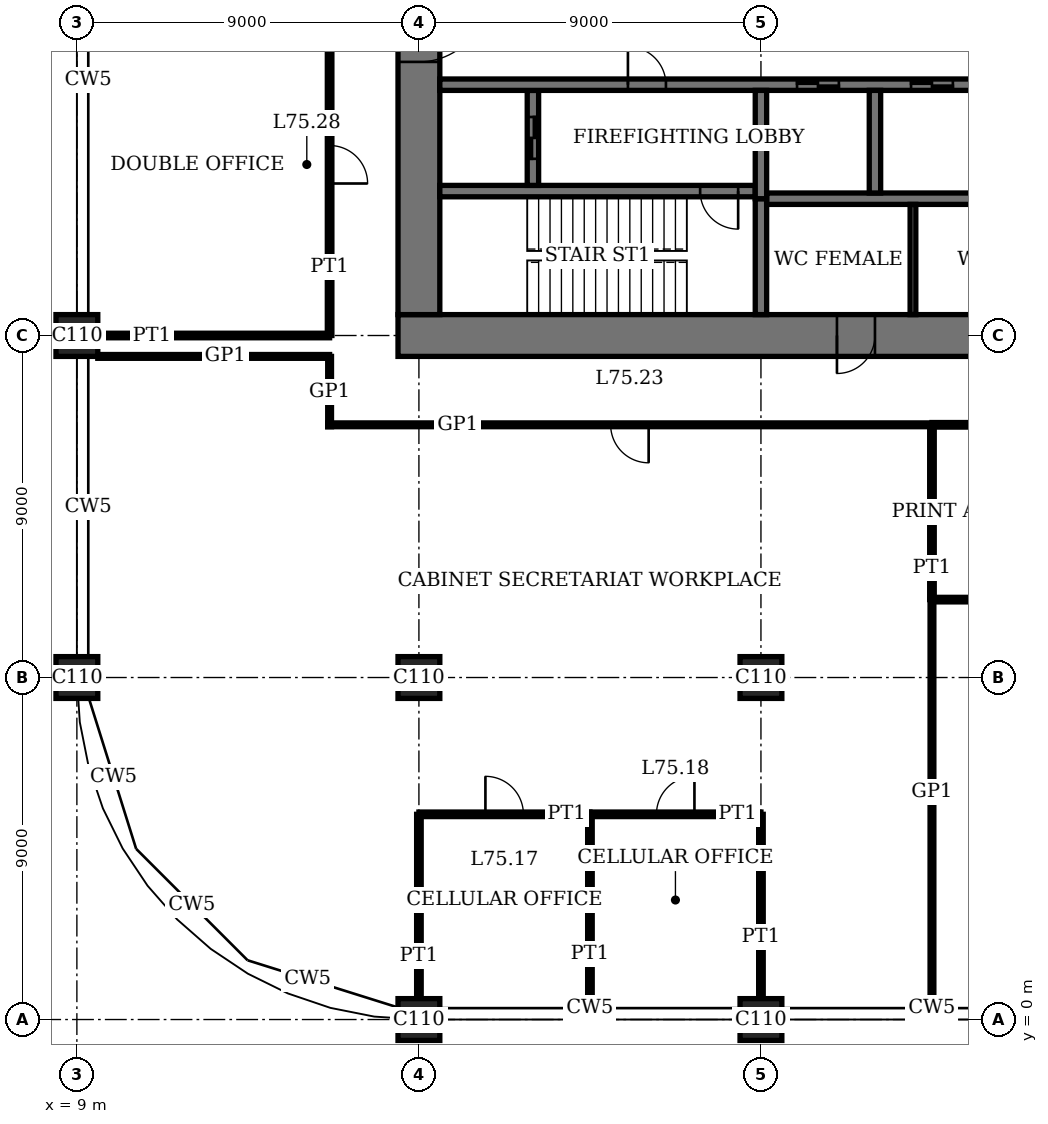
"""IFC4 building model, lengths in metres.
Left out: names, types, materials, properties, quantities, classifications, styles, units other than length and angle.
Written with IfcOpenShell. Run it as: python <this file> out.ifc"""

import sys

from ifc_helpers import new_model, si_unit, direction, frame, frame_2d, origin, origin_2d, place, context, subcontext, project, spatial, rectangle, extrude, element, fill, save


model = new_model("IFC4")
c1 = context("Model", 3, precision=1e-05, world=origin(), true_north=direction((0.0, 1.0)))
c2 = subcontext(c1, "Body", "Model", "MODEL_VIEW")
j1 = project(units=[si_unit("LENGTHUNIT", "METRE"), si_unit("PLANEANGLEUNIT", "RADIAN")], contexts=[c1])
p1 = place(None, origin())
s1 = spatial("IfcSite", under=j1, at=p1, CompositionType="ELEMENT")
p2 = place(p1, origin())
s2 = spatial("IfcBuilding", under=s1, at=p2, CompositionType="ELEMENT")
p3 = place(p2, frame((0.0, 0.0, 307.4)))
s3 = spatial("IfcBuildingStorey", under=s2, at=p3, CompositionType="ELEMENT", Elevation=307.4)
for number, where, z_axis, x_axis in (
    (1, (9.0, 9.0, 0.0), (0.0, 0.0, 1.0), (1.0, 0.0, 0.0)),
    (2, (9.0, 18.0, 0.0), (0.0, 0.0, 1.0), (1.0, 0.0, 0.0)),
    (3, (18.0, 0.0, 0.0), (0.0, 0.0, 1.0), (1.0, 0.0, 0.0)),
    (4, (18.0, 9.0, 0.0), (0.0, 0.0, 1.0), (1.0, 0.0, 0.0)),
    (5, (27.0, 0.0, 0.0), (0.0, 0.0, 1.0), (1.0, 0.0, 0.0)),
    (6, (27.0, 9.0, 0.0), (0.0, 0.0, 1.0), (1.0, 0.0, 0.0)),
):
    element("IfcColumn", number, at=place(p3, frame(where, z_axis=z_axis, x_axis=x_axis)), inside=s3, PredefinedType="COLUMN", context=c2, shape_type="SweptSolid", body=[
        extrude(rectangle(XDim=1.1, YDim=1.1, at=origin_2d()), origin(), (0.0, 0.0, 1.0), 4.4),
    ])
p4 = place(p3, frame((17.45, 18.0, 0.0), z_axis=(0.0, 0.0, 1.0), x_axis=(1.0, 0.0, 0.0)))
e7 = element("IfcWall", 7, at=p4, inside=s3, PredefinedType="SHEAR", context=c2, shape_type="SweptSolid", body=[
    extrude(rectangle(XDim=28.1, YDim=1.1, at=frame_2d((14.05, 0.0))), origin(), (0.0, 0.0, 1.0), 4.4),
])
p5 = place(p4, frame((11.55, 0.0, 0.0)))
e8 = element("IfcOpeningElement", 8, at=p5, cuts=e7, PredefinedType="OPENING", context=c2, shape_type="SweptSolid", body=[
    extrude(rectangle(XDim=1.0, YDim=2.4, at=frame_2d((0.5, 1.2))), frame((0.0, 0.56, 0.0), z_axis=(0.0, -1.0, 0.0), x_axis=(1.0, 0.0, 0.0)), (0.0, 0.0, 1.0), 1.12),
])
p6 = place(p4, frame((16.55, 0.0, 0.0)))
e9 = element("IfcOpeningElement", 9, at=p6, cuts=e7, PredefinedType="OPENING", context=c2, shape_type="SweptSolid", body=[
    extrude(rectangle(XDim=1.0, YDim=2.4, at=frame_2d((0.5, 1.2))), frame((0.0, 0.56, 0.0), z_axis=(0.0, -1.0, 0.0), x_axis=(1.0, 0.0, 0.0)), (0.0, 0.0, 1.0), 1.12),
])
p7 = place(p4, frame((20.0, 0.0, 0.0)))
e10 = element("IfcOpeningElement", 10, at=p7, cuts=e7, PredefinedType="OPENING", context=c2, shape_type="SweptSolid", body=[
    extrude(rectangle(XDim=1.1, YDim=2.4, at=frame_2d((0.55, 1.2))), frame((0.0, 0.56, 0.0), z_axis=(0.0, -1.0, 0.0), x_axis=(1.0, 0.0, 0.0)), (0.0, 0.0, 1.0), 1.12),
])
p8 = place(p4, frame((24.05, 0.0, 0.0)))
e11 = element("IfcOpeningElement", 11, at=p8, cuts=e7, PredefinedType="OPENING", context=c2, shape_type="SweptSolid", body=[
    extrude(rectangle(XDim=1.0, YDim=2.4, at=frame_2d((0.5, 1.2))), frame((0.0, 0.56, 0.0), z_axis=(0.0, -1.0, 0.0), x_axis=(1.0, 0.0, 0.0)), (0.0, 0.0, 1.0), 1.12),
])
p9 = place(p3, frame((18.0, 35.45, 0.0), z_axis=(0.0, 0.0, 1.0), x_axis=(0.0, -1.0, 0.0)))
e12 = element("IfcWall", 12, at=p9, inside=s3, PredefinedType="SHEAR", context=c2, shape_type="SweptSolid", body=[
    extrude(rectangle(XDim=16.9, YDim=1.1, at=frame_2d((8.45, 0.0))), origin(), (0.0, 0.0, 1.0), 4.4),
])
p10 = place(p9, frame((8.45, 0.0, 0.0)))
e13 = element("IfcOpeningElement", 13, at=p10, cuts=e12, PredefinedType="OPENING", context=c2, shape_type="SweptSolid", body=[
    extrude(rectangle(XDim=1.8, YDim=2.4, at=frame_2d((0.9, 1.2))), frame((0.0, 0.56, 0.0), z_axis=(0.0, -1.0, 0.0), x_axis=(1.0, 0.0, 0.0)), (0.0, 0.0, 1.0), 1.12),
])
p11 = place(p3, frame((18.55, 21.8, 0.0), z_axis=(0.0, 0.0, 1.0), x_axis=(1.0, 0.0, 0.0)))
e14 = element("IfcWall", 14, at=p11, inside=s3, PredefinedType="SHEAR", context=c2, shape_type="SweptSolid", body=[
    extrude(rectangle(XDim=8.3, YDim=0.3, at=frame_2d((4.15, 0.0))), origin(), (0.0, 0.0, 1.0), 4.4),
])
p12 = place(p11, frame((6.85, 0.0, 0.0)))
e15 = element("IfcOpeningElement", 15, at=p12, cuts=e14, PredefinedType="OPENING", context=c2, shape_type="SweptSolid", body=[
    extrude(rectangle(XDim=1.0, YDim=2.4, at=frame_2d((0.5, 1.2))), frame((0.0, 0.16, 0.0), z_axis=(0.0, -1.0, 0.0), x_axis=(1.0, 0.0, 0.0)), (0.0, 0.0, 1.0), 0.32),
])
p13 = place(p3, frame((27.0, 18.55, 0.0), z_axis=(0.0, 0.0, 1.0), x_axis=(0.0, 1.0, 0.0)))
e16 = element("IfcWall", 16, at=p13, inside=s3, PredefinedType="SHEAR", context=c2, shape_type="SweptSolid", body=[
    extrude(rectangle(XDim=3.05, YDim=0.3, at=frame_2d((1.525, 0.0))), origin(), (0.0, 0.0, 1.0), 4.4),
])
p14 = place(p3, frame((21.0, 21.95, 0.0), z_axis=(0.0, 0.0, 1.0), x_axis=(0.0, 1.0, 0.0)))
e17 = element("IfcWall", 17, at=p14, inside=s3, PredefinedType="SHEAR", context=c2, shape_type="SweptSolid", body=[
    extrude(rectangle(XDim=2.5, YDim=0.3, at=frame_2d((1.25, 0.0))), origin(), (0.0, 0.0, 1.0), 4.4),
])
p15 = place(p14, frame((0.7, 0.0, 0.0)))
e18 = element("IfcOpeningElement", 18, at=p15, cuts=e17, PredefinedType="OPENING", context=c2, shape_type="SweptSolid", body=[
    extrude(rectangle(XDim=1.1, YDim=2.4, at=frame_2d((0.55, 1.2))), frame((0.0, 0.16, 0.0), z_axis=(0.0, -1.0, 0.0), x_axis=(1.0, 0.0, 0.0)), (0.0, 0.0, 1.0), 0.32),
])
p16 = place(p3, frame((18.55, 24.6, 0.0), z_axis=(0.0, 0.0, 1.0), x_axis=(1.0, 0.0, 0.0)))
e19 = element("IfcWall", 19, at=p16, inside=s3, PredefinedType="SHEAR", context=c2, shape_type="SweptSolid", body=[
    extrude(rectangle(XDim=25.9, YDim=0.3, at=frame_2d((12.95, 0.0))), origin(), (0.0, 0.0, 1.0), 4.4),
])
p17 = place(p16, frame((4.95, 0.0, 0.0)))
e20 = element("IfcOpeningElement", 20, at=p17, cuts=e19, PredefinedType="OPENING", context=c2, shape_type="SweptSolid", body=[
    extrude(rectangle(XDim=1.0, YDim=2.4, at=frame_2d((0.5, 1.2))), frame((0.0, 0.16, 0.0), z_axis=(0.0, -1.0, 0.0), x_axis=(1.0, 0.0, 0.0)), (0.0, 0.0, 1.0), 0.32),
])
p18 = place(p16, frame((24.5, 0.0, 0.0)))
e21 = element("IfcOpeningElement", 21, at=p18, cuts=e19, PredefinedType="OPENING", context=c2, shape_type="SweptSolid", body=[
    extrude(rectangle(XDim=0.9, YDim=2.1, at=frame_2d((0.45, 1.05))), frame((0.0, 0.16, 0.0), z_axis=(0.0, -1.0, 0.0), x_axis=(1.0, 0.0, 0.0)), (0.0, 0.0, 1.0), 0.32),
])
p19 = place(p16, frame((9.4, 0.0, 0.0)))
e22 = element("IfcOpeningElement", 22, at=p19, cuts=e19, PredefinedType="OPENING", context=c2, shape_type="SweptSolid", body=[
    extrude(rectangle(XDim=1.1, YDim=2.4, at=frame_2d((0.55, 1.2))), frame((0.0, 0.16, 0.0), z_axis=(0.0, -1.0, 0.0), x_axis=(1.0, 0.0, 0.0)), (0.0, 0.0, 1.0), 0.32),
])
p20 = place(p16, frame((12.4, 0.0, 0.0)))
e23 = element("IfcOpeningElement", 23, at=p20, cuts=e19, PredefinedType="OPENING", context=c2, shape_type="SweptSolid", body=[
    extrude(rectangle(XDim=1.1, YDim=2.4, at=frame_2d((0.55, 1.2))), frame((0.0, 0.16, 0.0), z_axis=(0.0, -1.0, 0.0), x_axis=(1.0, 0.0, 0.0)), (0.0, 0.0, 1.0), 0.32),
])
p21 = place(p16, frame((15.4, 0.0, 0.0)))
e24 = element("IfcOpeningElement", 24, at=p21, cuts=e19, PredefinedType="OPENING", context=c2, shape_type="SweptSolid", body=[
    extrude(rectangle(XDim=1.1, YDim=2.4, at=frame_2d((0.55, 1.2))), frame((0.0, 0.16, 0.0), z_axis=(0.0, -1.0, 0.0), x_axis=(1.0, 0.0, 0.0)), (0.0, 0.0, 1.0), 0.32),
])
p22 = place(p16, frame((18.4, 0.0, 0.0)))
e25 = element("IfcOpeningElement", 25, at=p22, cuts=e19, PredefinedType="OPENING", context=c2, shape_type="SweptSolid", body=[
    extrude(rectangle(XDim=1.1, YDim=2.4, at=frame_2d((0.55, 1.2))), frame((0.0, 0.16, 0.0), z_axis=(0.0, -1.0, 0.0), x_axis=(1.0, 0.0, 0.0)), (0.0, 0.0, 1.0), 0.32),
])
p23 = place(p16, frame((21.3, 0.0, 0.0)))
e26 = element("IfcOpeningElement", 26, at=p23, cuts=e19, PredefinedType="OPENING", context=c2, shape_type="SweptSolid", body=[
    extrude(rectangle(XDim=1.3, YDim=2.4, at=frame_2d((0.65, 1.2))), frame((0.0, 0.16, 0.0), z_axis=(0.0, -1.0, 0.0), x_axis=(1.0, 0.0, 0.0)), (0.0, 0.0, 1.0), 0.32),
])
p24 = place(p3, frame((27.15, 21.6, 0.0), z_axis=(0.0, 0.0, 1.0), x_axis=(1.0, 0.0, 0.0)))
e27 = element("IfcWall", 27, at=p24, inside=s3, PredefinedType="SHEAR", context=c2, shape_type="SweptSolid", body=[
    extrude(rectangle(XDim=17.3, YDim=0.3, at=frame_2d((8.65, 0.0))), origin(), (0.0, 0.0, 1.0), 4.4),
])
p25 = place(p3, frame((30.0, 21.75, 0.0), z_axis=(0.0, 0.0, 1.0), x_axis=(0.0, 1.0, 0.0)))
e28 = element("IfcWall", 28, at=p25, inside=s3, PredefinedType="SHEAR", context=c2, shape_type="SweptSolid", body=[
    extrude(rectangle(XDim=2.7, YDim=0.3, at=frame_2d((1.35, 0.0))), origin(), (0.0, 0.0, 1.0), 4.4),
])
p26 = place(p3, frame((27.0, 21.6, 0.0), z_axis=(0.0, 0.0, 1.0), x_axis=(0.0, 1.0, 0.0)))
e29 = element("IfcWall", 29, at=p26, inside=s3, PredefinedType="SHEAR", context=c2, shape_type="SweptSolid", body=[
    extrude(rectangle(XDim=2.85, YDim=0.3, at=frame_2d((1.425, 0.0))), origin(), (0.0, 0.0, 1.0), 4.4),
])
p27 = place(p3, frame((18.0, 5.4, 0.0), z_axis=(0.0, 0.0, 1.0), x_axis=(1.0, 0.0, 0.0)))
e30 = element("IfcWall", 30, at=p27, inside=s3, PredefinedType="PARTITIONING", context=c2, shape_type="SweptSolid", body=[
    extrude(rectangle(XDim=4.5, YDim=0.12, at=frame_2d((2.25, 0.0))), origin(), (0.0, 0.0, 1.0), 4.05),
])
p28 = place(p27, frame((1.75, 0.0, 0.0)))
e31 = element("IfcOpeningElement", 31, at=p28, cuts=e30, PredefinedType="OPENING", context=c2, shape_type="SweptSolid", body=[
    extrude(rectangle(XDim=1.0, YDim=2.4, at=frame_2d((0.5, 1.2))), frame((0.0, 0.07, 0.0), z_axis=(0.0, -1.0, 0.0), x_axis=(1.0, 0.0, 0.0)), (0.0, 0.0, 1.0), 0.14),
])
p29 = place(p3, frame((22.5, 5.4, 0.0), z_axis=(0.0, 0.0, 1.0), x_axis=(1.0, 0.0, 0.0)))
e32 = element("IfcWall", 32, at=p29, inside=s3, PredefinedType="PARTITIONING", context=c2, shape_type="SweptSolid", body=[
    extrude(rectangle(XDim=4.5, YDim=0.12, at=frame_2d((2.25, 0.0))), origin(), (0.0, 0.0, 1.0), 4.05),
])
p30 = place(p29, frame((1.75, 0.0, 0.0)))
e33 = element("IfcOpeningElement", 33, at=p30, cuts=e32, PredefinedType="OPENING", context=c2, shape_type="SweptSolid", body=[
    extrude(rectangle(XDim=1.0, YDim=2.4, at=frame_2d((0.5, 1.2))), frame((0.0, 0.07, 0.0), z_axis=(0.0, -1.0, 0.0), x_axis=(1.0, 0.0, 0.0)), (0.0, 0.0, 1.0), 0.14),
])
p31 = place(p3, frame((31.5, 11.05, 0.0), z_axis=(0.0, 0.0, 1.0), x_axis=(1.0, 0.0, 0.0)))
e34 = element("IfcWall", 34, at=p31, inside=s3, PredefinedType="PARTITIONING", context=c2, shape_type="SweptSolid", body=[
    extrude(rectangle(XDim=4.5, YDim=0.12, at=frame_2d((2.25, 0.0))), origin(), (0.0, 0.0, 1.0), 4.05),
])
p32 = place(p31, frame((1.75, 0.0, 0.0)))
e35 = element("IfcOpeningElement", 35, at=p32, cuts=e34, PredefinedType="OPENING", context=c2, shape_type="SweptSolid", body=[
    extrude(rectangle(XDim=1.0, YDim=2.4, at=frame_2d((0.5, 1.2))), frame((0.0, 0.07, 0.0), z_axis=(0.0, -1.0, 0.0), x_axis=(1.0, 0.0, 0.0)), (0.0, 0.0, 1.0), 0.14),
])
p33 = place(p3, frame((31.5, 15.65, 0.0), z_axis=(0.0, 0.0, 1.0), x_axis=(1.0, 0.0, 0.0)))
e36 = element("IfcWall", 36, at=p33, inside=s3, PredefinedType="PARTITIONING", context=c2, shape_type="SweptSolid", body=[
    extrude(rectangle(XDim=4.5, YDim=0.12, at=frame_2d((2.25, 0.0))), origin(), (0.0, 0.0, 1.0), 4.05),
])
p34 = place(p3, frame((15.6, 15.65, 0.0), z_axis=(0.0, 0.0, 1.0), x_axis=(1.0, 0.0, 0.0)))
e37 = element("IfcWall", 37, at=p34, inside=s3, PredefinedType="PARTITIONING", context=c2, shape_type="SweptSolid", body=[
    extrude(rectangle(XDim=15.89, YDim=0.1, at=frame_2d((7.945, 0.0))), origin(), (0.0, 0.0, 1.0), 4.05),
])
p35 = place(p34, frame((7.445, 0.0, 0.0)))
e38 = element("IfcOpeningElement", 38, at=p35, cuts=e37, PredefinedType="OPENING", context=c2, shape_type="SweptSolid", body=[
    extrude(rectangle(XDim=1.0, YDim=2.4, at=frame_2d((0.5, 1.2))), frame((0.0, 0.06, 0.0), z_axis=(0.0, -1.0, 0.0), x_axis=(1.0, 0.0, 0.0)), (0.0, 0.0, 1.0), 0.12),
])
p36 = place(p3, frame((9.55, 17.45, 0.0), z_axis=(0.0, 0.0, 1.0), x_axis=(1.0, 0.0, 0.0)))
e39 = element("IfcWall", 39, at=p36, inside=s3, PredefinedType="PARTITIONING", context=c2, shape_type="SweptSolid", body=[
    extrude(rectangle(XDim=6.1, YDim=0.1, at=frame_2d((3.05, 0.0))), origin(), (0.0, 0.0, 1.0), 4.05),
])
p37 = place(p3, frame((9.55, 18.0, 0.0), z_axis=(0.0, 0.0, 1.0), x_axis=(1.0, 0.0, 0.0)))
e40 = element("IfcWall", 40, at=p37, inside=s3, PredefinedType="PARTITIONING", context=c2, shape_type="SweptSolid", body=[
    extrude(rectangle(XDim=6.1, YDim=0.12, at=frame_2d((3.05, 0.0))), origin(), (0.0, 0.0, 1.0), 3.25),
])
p38 = place(p3, frame((15.65, 18.0, 0.0), z_axis=(0.0, 0.0, 1.0), x_axis=(0.0, 1.0, 0.0)))
e41 = element("IfcWall", 41, at=p38, inside=s3, PredefinedType="PARTITIONING", context=c2, shape_type="SweptSolid", body=[
    extrude(rectangle(XDim=9.0, YDim=0.12, at=frame_2d((4.5, 0.0))), origin(), (0.0, 0.0, 1.0), 4.05),
])
p39 = place(p38, frame((4.0, 0.0, 0.0)))
e42 = element("IfcOpeningElement", 42, at=p39, cuts=e41, PredefinedType="OPENING", context=c2, shape_type="SweptSolid", body=[
    extrude(rectangle(XDim=1.0, YDim=2.4, at=frame_2d((0.5, 1.2))), frame((0.0, 0.07, 0.0), z_axis=(0.0, -1.0, 0.0), x_axis=(1.0, 0.0, 0.0)), (0.0, 0.0, 1.0), 0.14),
])
p40 = place(p3, frame((15.65, 15.6, 0.0), z_axis=(0.0, 0.0, 1.0), x_axis=(0.0, 1.0, 0.0)))
e43 = element("IfcWall", 43, at=p40, inside=s3, PredefinedType="PARTITIONING", context=c2, shape_type="SweptSolid", body=[
    extrude(rectangle(XDim=1.85, YDim=0.1, at=frame_2d((0.925, 0.0))), origin(), (0.0, 0.0, 1.0), 4.05),
])
p41 = place(p3, frame((18.0, 0.55, 0.0), z_axis=(0.0, 0.0, 1.0), x_axis=(0.0, 1.0, 0.0)))
e44 = element("IfcWall", 44, at=p41, inside=s3, PredefinedType="PARTITIONING", context=c2, shape_type="SweptSolid", body=[
    extrude(rectangle(XDim=4.85, YDim=0.12, at=frame_2d((2.425, 0.0))), origin(), (0.0, 0.0, 1.0), 3.25),
])
p42 = place(p3, frame((22.5, 0.31, 0.0), z_axis=(0.0, 0.0, 1.0), x_axis=(0.0, 1.0, 0.0)))
e45 = element("IfcWall", 45, at=p42, inside=s3, PredefinedType="PARTITIONING", context=c2, shape_type="SweptSolid", body=[
    extrude(rectangle(XDim=5.09, YDim=0.12, at=frame_2d((2.545, 0.0))), origin(), (0.0, 0.0, 1.0), 4.05),
])
p43 = place(p3, frame((27.0, 0.55, 0.0), z_axis=(0.0, 0.0, 1.0), x_axis=(0.0, 1.0, 0.0)))
e46 = element("IfcWall", 46, at=p43, inside=s3, PredefinedType="PARTITIONING", context=c2, shape_type="SweptSolid", body=[
    extrude(rectangle(XDim=4.85, YDim=0.12, at=frame_2d((2.425, 0.0))), origin(), (0.0, 0.0, 1.0), 3.25),
])
p44 = place(p3, frame((31.5, 11.05, 0.0), z_axis=(0.0, 0.0, 1.0), x_axis=(0.0, 1.0, 0.0)))
e47 = element("IfcWall", 47, at=p44, inside=s3, PredefinedType="PARTITIONING", context=c2, shape_type="SweptSolid", body=[
    extrude(rectangle(XDim=4.6, YDim=0.12, at=frame_2d((2.3, 0.0))), origin(), (0.0, 0.0, 1.0), 4.05),
])
p45 = place(p3, frame((31.5, 0.31, 0.0), z_axis=(0.0, 0.0, 1.0), x_axis=(0.0, 1.0, 0.0)))
e48 = element("IfcWall", 48, at=p45, inside=s3, PredefinedType="PARTITIONING", context=c2, shape_type="SweptSolid", body=[
    extrude(rectangle(XDim=10.74, YDim=0.1, at=frame_2d((5.37, 0.0))), origin(), (0.0, 0.0, 1.0), 4.05),
])
p46 = place(p3, frame((31.0, 18.55, 0.0), z_axis=(0.0, 0.0, 1.0), x_axis=(0.0, 1.0, 0.0)))
e49 = element("IfcWall", 49, at=p46, inside=s3, PredefinedType="PARTITIONING", context=c2, shape_type="SweptSolid", body=[
    extrude(rectangle(XDim=2.9, YDim=0.15, at=frame_2d((1.45, 0.0))), origin(), (0.0, 0.0, 1.0), 4.05),
])
p47 = place(p10, origin())
e50 = element("IfcDoor", 50, at=p47, inside=s3, OperationType="DOUBLE_DOOR_DOUBLE_SWING", PredefinedType="DOOR", context=c2, shape_type="SweptSolid", body=[
    extrude(rectangle(XDim=1.8, YDim=2.4, at=frame_2d((0.9, 1.2))), frame((0.0, 0.03, 0.0), z_axis=(0.0, -1.0, 0.0), x_axis=(1.0, 0.0, 0.0)), (0.0, 0.0, 1.0), 0.06),
    extrude(rectangle(XDim=0.04, YDim=2.4, at=frame_2d((0.02, 1.2))), frame((0.0, 0.55, 0.0), z_axis=(0.0, -1.0, 0.0), x_axis=(1.0, 0.0, 0.0)), (0.0, 0.0, 1.0), 1.1),
    extrude(rectangle(XDim=0.04, YDim=2.4, at=frame_2d((1.78, 1.2))), frame((0.0, 0.55, 0.0), z_axis=(0.0, -1.0, 0.0), x_axis=(1.0, 0.0, 0.0)), (0.0, 0.0, 1.0), 1.1),
    extrude(rectangle(XDim=1.8, YDim=0.04, at=frame_2d((0.9, 2.38))), frame((0.0, 0.55, 0.0), z_axis=(0.0, -1.0, 0.0), x_axis=(1.0, 0.0, 0.0)), (0.0, 0.0, 1.0), 1.1),
])
fill(e13, e50)
p48 = place(p5, origin())
e51 = element("IfcDoor", 51, at=p48, inside=s3, OperationType="SINGLE_SWING_LEFT", PredefinedType="DOOR", context=c2, shape_type="SweptSolid", body=[
    extrude(rectangle(XDim=1.0, YDim=2.4, at=frame_2d((0.5, 1.2))), frame((0.0, 0.025, 0.0), z_axis=(0.0, -1.0, 0.0), x_axis=(1.0, 0.0, 0.0)), (0.0, 0.0, 1.0), 0.05),
    extrude(rectangle(XDim=0.04, YDim=2.4, at=frame_2d((0.02, 1.2))), frame((0.0, 0.4, 0.0), z_axis=(0.0, -1.0, 0.0), x_axis=(1.0, 0.0, 0.0)), (0.0, 0.0, 1.0), 0.8),
    extrude(rectangle(XDim=0.04, YDim=2.4, at=frame_2d((0.98, 1.2))), frame((0.0, 0.4, 0.0), z_axis=(0.0, -1.0, 0.0), x_axis=(1.0, 0.0, 0.0)), (0.0, 0.0, 1.0), 0.8),
    extrude(rectangle(XDim=1.0, YDim=0.04, at=frame_2d((0.5, 2.38))), frame((0.0, 0.4, 0.0), z_axis=(0.0, -1.0, 0.0), x_axis=(1.0, 0.0, 0.0)), (0.0, 0.0, 1.0), 0.8),
])
fill(e8, e51)
p49 = place(p12, origin())
e52 = element("IfcDoor", 52, at=p49, inside=s3, OperationType="SINGLE_SWING_RIGHT", PredefinedType="DOOR", context=c2, shape_type="SweptSolid", body=[
    extrude(rectangle(XDim=1.0, YDim=2.4, at=frame_2d((0.5, 1.2))), frame((0.0, 0.03, 0.0), z_axis=(0.0, -1.0, 0.0), x_axis=(1.0, 0.0, 0.0)), (0.0, 0.0, 1.0), 0.06),
])
fill(e15, e52)
p50 = place(p17, origin())
e53 = element("IfcDoor", 53, at=p50, inside=s3, OperationType="SINGLE_SWING_RIGHT", PredefinedType="DOOR", context=c2, shape_type="SweptSolid", body=[
    extrude(rectangle(XDim=1.0, YDim=2.4, at=frame_2d((0.5, 1.2))), frame((0.0, 0.03, 0.0), z_axis=(0.0, -1.0, 0.0), x_axis=(1.0, 0.0, 0.0)), (0.0, 0.0, 1.0), 0.06),
])
fill(e20, e53)
p51 = place(p28, origin())
e54 = element("IfcDoor", 54, at=p51, inside=s3, OperationType="SINGLE_SWING_RIGHT", PredefinedType="DOOR", context=c2, shape_type="SweptSolid", body=[
    extrude(rectangle(XDim=1.0, YDim=2.4, at=frame_2d((0.5, 1.2))), frame((0.0, 0.025, 0.0), z_axis=(0.0, -1.0, 0.0), x_axis=(1.0, 0.0, 0.0)), (0.0, 0.0, 1.0), 0.05),
])
fill(e31, e54)
p52 = place(p30, origin())
e55 = element("IfcDoor", 55, at=p52, inside=s3, OperationType="SINGLE_SWING_LEFT", PredefinedType="DOOR", context=c2, shape_type="SweptSolid", body=[
    extrude(rectangle(XDim=1.0, YDim=2.4, at=frame_2d((0.5, 1.2))), frame((0.0, 0.025, 0.0), z_axis=(0.0, -1.0, 0.0), x_axis=(1.0, 0.0, 0.0)), (0.0, 0.0, 1.0), 0.05),
])
fill(e33, e55)
p53 = place(p35, origin())
e56 = element("IfcDoor", 56, at=p53, inside=s3, OperationType="SINGLE_SWING_RIGHT", PredefinedType="DOOR", context=c2, shape_type="SweptSolid", body=[
    extrude(rectangle(XDim=1.0, YDim=2.4, at=frame_2d((0.5, 1.2))), frame((0.0, 0.02, 0.0), z_axis=(0.0, -1.0, 0.0), x_axis=(1.0, 0.0, 0.0)), (0.0, 0.0, 1.0), 0.04),
])
fill(e38, e56)
p54 = place(p39, origin())
e57 = element("IfcDoor", 57, at=p54, inside=s3, OperationType="SINGLE_SWING_LEFT", PredefinedType="DOOR", context=c2, shape_type="SweptSolid", body=[
    extrude(rectangle(XDim=1.0, YDim=2.4, at=frame_2d((0.5, 1.2))), frame((0.0, 0.025, 0.0), z_axis=(0.0, -1.0, 0.0), x_axis=(1.0, 0.0, 0.0)), (0.0, 0.0, 1.0), 0.05),
])
fill(e42, e57)
p55 = place(p19, origin())
e58 = element("IfcDoor", 58, at=p55, inside=s3, OperationType="DOUBLE_DOOR_SLIDING", PredefinedType="DOOR", context=c2, shape_type="SweptSolid", body=[
    extrude(rectangle(XDim=1.1, YDim=2.4, at=frame_2d((0.55, 1.2))), frame((0.0, 0.02, 0.0), z_axis=(0.0, -1.0, 0.0), x_axis=(1.0, 0.0, 0.0)), (0.0, 0.0, 1.0), 0.04),
])
fill(e22, e58)
p56 = place(p20, origin())
e59 = element("IfcDoor", 59, at=p56, inside=s3, OperationType="DOUBLE_DOOR_SLIDING", PredefinedType="DOOR", context=c2, shape_type="SweptSolid", body=[
    extrude(rectangle(XDim=1.1, YDim=2.4, at=frame_2d((0.55, 1.2))), frame((0.0, 0.02, 0.0), z_axis=(0.0, -1.0, 0.0), x_axis=(1.0, 0.0, 0.0)), (0.0, 0.0, 1.0), 0.04),
])
fill(e23, e59)
p57 = place(p15, origin())
e60 = element("IfcDoor", 60, at=p57, inside=s3, OperationType="DOUBLE_DOOR_SLIDING", PredefinedType="DOOR", context=c2, shape_type="SweptSolid", body=[
    extrude(rectangle(XDim=1.1, YDim=2.4, at=frame_2d((0.55, 1.2))), frame((0.0, 0.03, 0.0), z_axis=(0.0, -1.0, 0.0), x_axis=(1.0, 0.0, 0.0)), (0.0, 0.0, 1.0), 0.06),
])
fill(e18, e60)
save(model, sys.argv[1])
